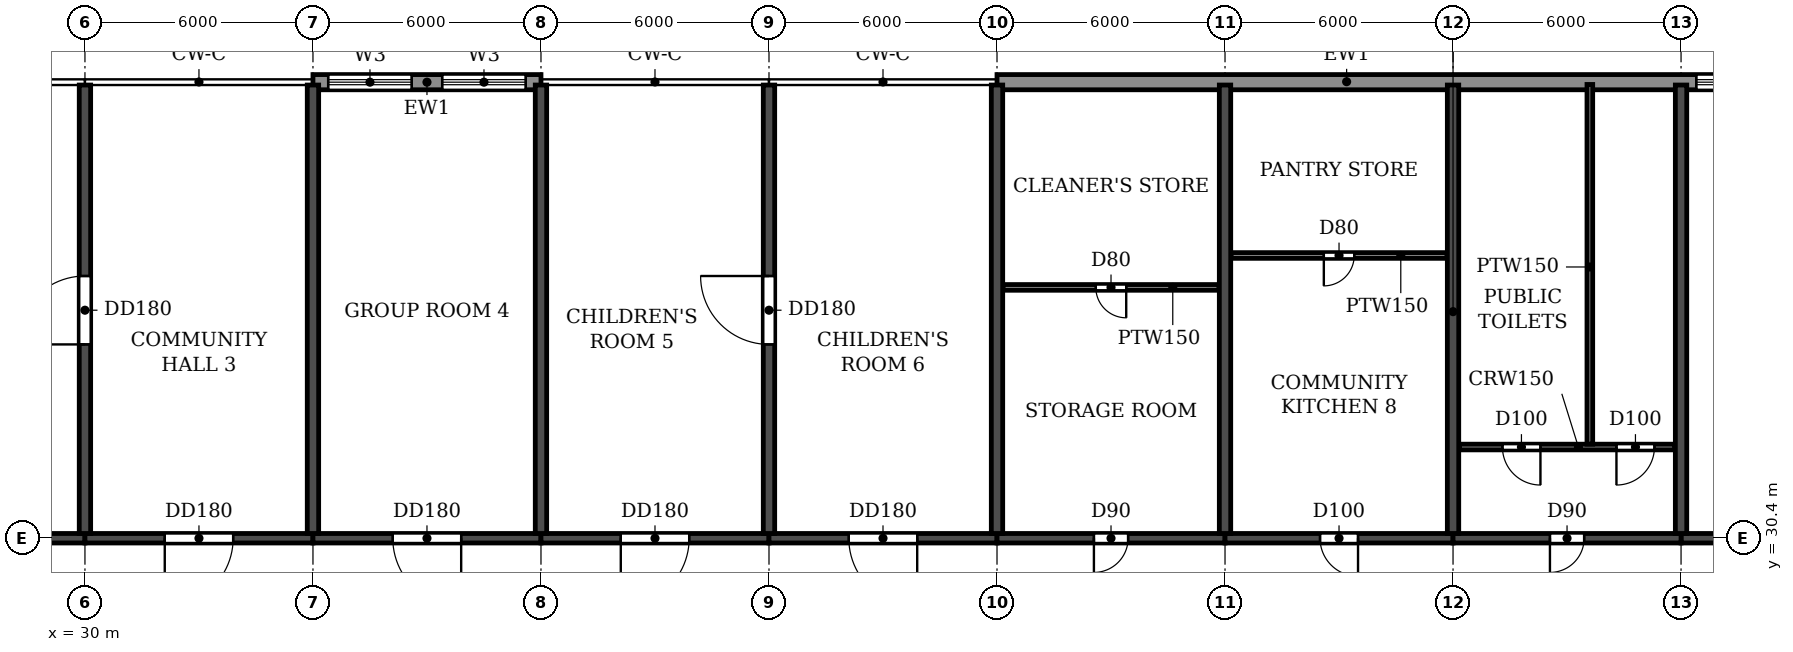
"""IFC4 building model, lengths in metres.
Left out: names, types, materials, properties, quantities, classifications, styles, units other than length and angle.
Written with IfcOpenShell. Run it as: python <this file> out.ifc"""

import sys

from ifc_helpers import new_model, si_unit, direction, frame, frame_2d, origin, place, context, subcontext, project, spatial, rectangle, extrude, element, fill, save


model = new_model("IFC4")
c1 = context("Model", 3, precision=1e-05, world=origin(), true_north=direction((0.0, 1.0)))
c2 = subcontext(c1, "Body", "Model", "MODEL_VIEW")
j1 = project(units=[si_unit("LENGTHUNIT", "METRE"), si_unit("PLANEANGLEUNIT", "RADIAN")], contexts=[c1])
p1 = place(None, origin())
s1 = spatial("IfcSite", under=j1, at=p1, CompositionType="ELEMENT")
p2 = place(p1, origin())
s2 = spatial("IfcBuilding", under=s1, at=p2, CompositionType="ELEMENT")
p3 = place(p2, frame((0.0, 0.0, 158.7)))
s3 = spatial("IfcBuildingStorey", under=s2, at=p3, CompositionType="ELEMENT", Elevation=158.7)
p4 = place(p3, frame((30.0, 30.525, 0.0), z_axis=(0.0, 0.0, 1.0), x_axis=(0.0, 1.0, 0.0)))
e1 = element("IfcWall", 1, at=p4, inside=s3, PredefinedType="SHEAR", context=c2, shape_type="SweptSolid", body=[
    extrude(rectangle(XDim=11.8, YDim=0.3, at=frame_2d((5.9, 0.0))), origin(), (0.0, 0.0, 1.0), 3.07),
])
p5 = place(p4, frame((4.975, 0.0, 0.0)))
e2 = element("IfcOpeningElement", 2, at=p5, cuts=e1, PredefinedType="OPENING", context=c2, shape_type="SweptSolid", body=[
    extrude(rectangle(XDim=1.8, YDim=2.1, at=frame_2d((0.9, 1.05))), frame((0.0, 0.16, 0.0), z_axis=(0.0, -1.0, 0.0), x_axis=(1.0, 0.0, 0.0)), (0.0, 0.0, 1.0), 0.32),
])
for number, where, z_axis, x_axis in (
    (3, (36.0, 30.525, 0.0), (0.0, 0.0, 1.0), (0.0, 1.0, 0.0)),
    (4, (42.0, 30.525, 0.0), (0.0, 0.0, 1.0), (0.0, 1.0, 0.0)),
):
    element("IfcWall", number, at=place(p3, frame(where, z_axis=z_axis, x_axis=x_axis)), inside=s3, PredefinedType="SHEAR", context=c2, shape_type="SweptSolid", body=[
        extrude(rectangle(XDim=11.8, YDim=0.3, at=frame_2d((5.9, 0.0))), origin(), (0.0, 0.0, 1.0), 3.07),
    ])
p6 = place(p3, frame((48.0, 30.525, 0.0), z_axis=(0.0, 0.0, 1.0), x_axis=(0.0, 1.0, 0.0)))
e5 = element("IfcWall", 5, at=p6, inside=s3, PredefinedType="SHEAR", context=c2, shape_type="SweptSolid", body=[
    extrude(rectangle(XDim=11.8, YDim=0.3, at=frame_2d((5.9, 0.0))), origin(), (0.0, 0.0, 1.0), 3.07),
])
p7 = place(p6, frame((4.975, 0.0, 0.0)))
e6 = element("IfcOpeningElement", 6, at=p7, cuts=e5, PredefinedType="OPENING", context=c2, shape_type="SweptSolid", body=[
    extrude(rectangle(XDim=1.8, YDim=2.1, at=frame_2d((0.9, 1.05))), frame((0.0, 0.16, 0.0), z_axis=(0.0, -1.0, 0.0), x_axis=(1.0, 0.0, 0.0)), (0.0, 0.0, 1.0), 0.32),
])
for number, where, z_axis, x_axis in (
    (7, (54.0, 30.525, 0.0), (0.0, 0.0, 1.0), (0.0, 1.0, 0.0)),
    (8, (60.0, 30.525, 0.0), (0.0, 0.0, 1.0), (0.0, 1.0, 0.0)),
    (9, (66.0, 30.525, 0.0), (0.0, 0.0, 1.0), (0.0, 1.0, 0.0)),
    (10, (72.0, 30.525, 0.0), (0.0, 0.0, 1.0), (0.0, 1.0, 0.0)),
):
    element("IfcWall", number, at=place(p3, frame(where, z_axis=z_axis, x_axis=x_axis)), inside=s3, PredefinedType="SHEAR", context=c2, shape_type="SweptSolid", body=[
        extrude(rectangle(XDim=11.8, YDim=0.3, at=frame_2d((5.9, 0.0))), origin(), (0.0, 0.0, 1.0), 3.07),
    ])
p8 = place(p3, frame((24.0, 30.4, 0.0), z_axis=(0.0, 0.0, 1.0), x_axis=(1.0, 0.0, 0.0)))
e11 = element("IfcWall", 11, at=p8, inside=s3, PredefinedType="SHEAR", context=c2, shape_type="SweptSolid", body=[
    extrude(rectangle(XDim=6.0, YDim=0.25, at=frame_2d((3.0, 0.0))), origin(), (0.0, 0.0, 1.0), 2.47),
])
p9 = place(p8, frame((2.1, 0.0, 0.0)))
e12 = element("IfcOpeningElement", 12, at=p9, cuts=e11, PredefinedType="OPENING", context=c2, shape_type="SweptSolid", body=[
    extrude(rectangle(XDim=1.8, YDim=2.1, at=frame_2d((0.9, 1.05))), frame((0.0, 0.135, 0.0), z_axis=(0.0, -1.0, 0.0), x_axis=(1.0, 0.0, 0.0)), (0.0, 0.0, 1.0), 0.27),
])
p10 = place(p3, frame((30.0, 30.4, 0.0), z_axis=(0.0, 0.0, 1.0), x_axis=(1.0, 0.0, 0.0)))
e13 = element("IfcWall", 13, at=p10, inside=s3, PredefinedType="SHEAR", context=c2, shape_type="SweptSolid", body=[
    extrude(rectangle(XDim=6.0, YDim=0.25, at=frame_2d((3.0, 0.0))), origin(), (0.0, 0.0, 1.0), 2.47),
])
p11 = place(p10, frame((2.1, 0.0, 0.0)))
e14 = element("IfcOpeningElement", 14, at=p11, cuts=e13, PredefinedType="OPENING", context=c2, shape_type="SweptSolid", body=[
    extrude(rectangle(XDim=1.8, YDim=2.1, at=frame_2d((0.9, 1.05))), frame((0.0, 0.135, 0.0), z_axis=(0.0, -1.0, 0.0), x_axis=(1.0, 0.0, 0.0)), (0.0, 0.0, 1.0), 0.27),
])
p12 = place(p3, frame((36.0, 30.4, 0.0), z_axis=(0.0, 0.0, 1.0), x_axis=(1.0, 0.0, 0.0)))
e15 = element("IfcWall", 15, at=p12, inside=s3, PredefinedType="SHEAR", context=c2, shape_type="SweptSolid", body=[
    extrude(rectangle(XDim=6.0, YDim=0.25, at=frame_2d((3.0, 0.0))), origin(), (0.0, 0.0, 1.0), 2.47),
])
p13 = place(p12, frame((2.1, 0.0, 0.0)))
e16 = element("IfcOpeningElement", 16, at=p13, cuts=e15, PredefinedType="OPENING", context=c2, shape_type="SweptSolid", body=[
    extrude(rectangle(XDim=1.8, YDim=2.1, at=frame_2d((0.9, 1.05))), frame((0.0, 0.135, 0.0), z_axis=(0.0, -1.0, 0.0), x_axis=(1.0, 0.0, 0.0)), (0.0, 0.0, 1.0), 0.27),
])
p14 = place(p3, frame((42.0, 30.4, 0.0), z_axis=(0.0, 0.0, 1.0), x_axis=(1.0, 0.0, 0.0)))
e17 = element("IfcWall", 17, at=p14, inside=s3, PredefinedType="SHEAR", context=c2, shape_type="SweptSolid", body=[
    extrude(rectangle(XDim=6.0, YDim=0.25, at=frame_2d((3.0, 0.0))), origin(), (0.0, 0.0, 1.0), 2.47),
])
p15 = place(p14, frame((2.1, 0.0, 0.0)))
e18 = element("IfcOpeningElement", 18, at=p15, cuts=e17, PredefinedType="OPENING", context=c2, shape_type="SweptSolid", body=[
    extrude(rectangle(XDim=1.8, YDim=2.1, at=frame_2d((0.9, 1.05))), frame((0.0, 0.135, 0.0), z_axis=(0.0, -1.0, 0.0), x_axis=(1.0, 0.0, 0.0)), (0.0, 0.0, 1.0), 0.27),
])
p16 = place(p3, frame((48.0, 30.4, 0.0), z_axis=(0.0, 0.0, 1.0), x_axis=(1.0, 0.0, 0.0)))
e19 = element("IfcWall", 19, at=p16, inside=s3, PredefinedType="SHEAR", context=c2, shape_type="SweptSolid", body=[
    extrude(rectangle(XDim=6.0, YDim=0.25, at=frame_2d((3.0, 0.0))), origin(), (0.0, 0.0, 1.0), 2.47),
])
p17 = place(p16, frame((2.1, 0.0, 0.0)))
e20 = element("IfcOpeningElement", 20, at=p17, cuts=e19, PredefinedType="OPENING", context=c2, shape_type="SweptSolid", body=[
    extrude(rectangle(XDim=1.8, YDim=2.1, at=frame_2d((0.9, 1.05))), frame((0.0, 0.135, 0.0), z_axis=(0.0, -1.0, 0.0), x_axis=(1.0, 0.0, 0.0)), (0.0, 0.0, 1.0), 0.27),
])
p18 = place(p3, frame((54.0, 30.4, 0.0), z_axis=(0.0, 0.0, 1.0), x_axis=(1.0, 0.0, 0.0)))
e21 = element("IfcWall", 21, at=p18, inside=s3, PredefinedType="SHEAR", context=c2, shape_type="SweptSolid", body=[
    extrude(rectangle(XDim=6.0, YDim=0.25, at=frame_2d((3.0, 0.0))), origin(), (0.0, 0.0, 1.0), 2.47),
])
p19 = place(p18, frame((2.55, 0.0, 0.0)))
e22 = element("IfcOpeningElement", 22, at=p19, cuts=e21, PredefinedType="OPENING", context=c2, shape_type="SweptSolid", body=[
    extrude(rectangle(XDim=0.9, YDim=2.1, at=frame_2d((0.45, 1.05))), frame((0.0, 0.135, 0.0), z_axis=(0.0, -1.0, 0.0), x_axis=(1.0, 0.0, 0.0)), (0.0, 0.0, 1.0), 0.27),
])
p20 = place(p3, frame((60.0, 30.4, 0.0), z_axis=(0.0, 0.0, 1.0), x_axis=(1.0, 0.0, 0.0)))
e23 = element("IfcWall", 23, at=p20, inside=s3, PredefinedType="SHEAR", context=c2, shape_type="SweptSolid", body=[
    extrude(rectangle(XDim=6.0, YDim=0.25, at=frame_2d((3.0, 0.0))), origin(), (0.0, 0.0, 1.0), 2.47),
])
p21 = place(p20, frame((2.5, 0.0, 0.0)))
e24 = element("IfcOpeningElement", 24, at=p21, cuts=e23, PredefinedType="OPENING", context=c2, shape_type="SweptSolid", body=[
    extrude(rectangle(XDim=1.0, YDim=2.1, at=frame_2d((0.5, 1.05))), frame((0.0, 0.135, 0.0), z_axis=(0.0, -1.0, 0.0), x_axis=(1.0, 0.0, 0.0)), (0.0, 0.0, 1.0), 0.27),
])
p22 = place(p3, frame((66.0, 30.4, 0.0), z_axis=(0.0, 0.0, 1.0), x_axis=(1.0, 0.0, 0.0)))
e25 = element("IfcWall", 25, at=p22, inside=s3, PredefinedType="SHEAR", context=c2, shape_type="SweptSolid", body=[
    extrude(rectangle(XDim=6.0, YDim=0.25, at=frame_2d((3.0, 0.0))), origin(), (0.0, 0.0, 1.0), 2.47),
])
p23 = place(p22, frame((2.55, 0.0, 0.0)))
e26 = element("IfcOpeningElement", 26, at=p23, cuts=e25, PredefinedType="OPENING", context=c2, shape_type="SweptSolid", body=[
    extrude(rectangle(XDim=0.9, YDim=2.1, at=frame_2d((0.45, 1.05))), frame((0.0, 0.135, 0.0), z_axis=(0.0, -1.0, 0.0), x_axis=(1.0, 0.0, 0.0)), (0.0, 0.0, 1.0), 0.27),
])
p24 = place(p3, frame((72.0, 30.4, 0.0), z_axis=(0.0, 0.0, 1.0), x_axis=(1.0, 0.0, 0.0)))
e27 = element("IfcWall", 27, at=p24, inside=s3, PredefinedType="SHEAR", context=c2, shape_type="SweptSolid", body=[
    extrude(rectangle(XDim=6.0, YDim=0.25, at=frame_2d((3.0, 0.0))), origin(), (0.0, 0.0, 1.0), 2.47),
])
p25 = place(p24, frame((2.1, 0.0, 0.0)))
e28 = element("IfcOpeningElement", 28, at=p25, cuts=e27, PredefinedType="OPENING", context=c2, shape_type="SweptSolid", body=[
    extrude(rectangle(XDim=1.8, YDim=2.1, at=frame_2d((0.9, 1.05))), frame((0.0, 0.135, 0.0), z_axis=(0.0, -1.0, 0.0), x_axis=(1.0, 0.0, 0.0)), (0.0, 0.0, 1.0), 0.27),
])
p26 = place(p3, frame((79.317, 42.4, 0.0), z_axis=(0.0, 0.0, 1.0), x_axis=(-1.0, 0.0, 0.0)))
e29 = element("IfcWall", 29, at=p26, inside=s3, PredefinedType="STANDARD", context=c2, shape_type="SweptSolid", body=[
    extrude(rectangle(XDim=25.317, YDim=0.4, at=frame_2d((12.659, 0.0))), origin(), (0.0, 0.0, 1.0), 3.07),
])
p27 = place(p26, frame((4.717, 0.0, 0.6)))
e30 = element("IfcOpeningElement", 30, at=p27, cuts=e29, PredefinedType="OPENING", context=c2, shape_type="SweptSolid", body=[
    extrude(rectangle(XDim=2.2, YDim=1.8, at=frame_2d((1.1, 0.9))), frame((0.0, 0.21, 0.0), z_axis=(0.0, -1.0, 0.0), x_axis=(1.0, 0.0, 0.0)), (0.0, 0.0, 1.0), 0.42),
])
p28 = place(p26, frame((1.717, 0.0, 0.6)))
e31 = element("IfcOpeningElement", 31, at=p28, cuts=e29, PredefinedType="OPENING", context=c2, shape_type="SweptSolid", body=[
    extrude(rectangle(XDim=2.2, YDim=1.8, at=frame_2d((1.1, 0.9))), frame((0.0, 0.21, 0.0), z_axis=(0.0, -1.0, 0.0), x_axis=(1.0, 0.0, 0.0)), (0.0, 0.0, 1.0), 0.42),
])
p29 = place(p3, frame((42.0, 42.4, 0.0), z_axis=(0.0, 0.0, 1.0), x_axis=(-1.0, 0.0, 0.0)))
e32 = element("IfcWall", 32, at=p29, inside=s3, PredefinedType="STANDARD", context=c2, shape_type="SweptSolid", body=[
    extrude(rectangle(XDim=6.0, YDim=0.4, at=frame_2d((3.0, 0.0))), origin(), (0.0, 0.0, 1.0), 3.07),
])
p30 = place(p29, frame((3.4, 0.0, 0.6)))
e33 = element("IfcOpeningElement", 33, at=p30, cuts=e32, PredefinedType="OPENING", context=c2, shape_type="SweptSolid", body=[
    extrude(rectangle(XDim=2.2, YDim=1.8, at=frame_2d((1.1, 0.9))), frame((0.0, 0.21, 0.0), z_axis=(0.0, -1.0, 0.0), x_axis=(1.0, 0.0, 0.0)), (0.0, 0.0, 1.0), 0.42),
])
p31 = place(p29, frame((0.4, 0.0, 0.6)))
e34 = element("IfcOpeningElement", 34, at=p31, cuts=e32, PredefinedType="OPENING", context=c2, shape_type="SweptSolid", body=[
    extrude(rectangle(XDim=2.2, YDim=1.8, at=frame_2d((1.1, 0.9))), frame((0.0, 0.21, 0.0), z_axis=(0.0, -1.0, 0.0), x_axis=(1.0, 0.0, 0.0)), (0.0, 0.0, 1.0), 0.42),
])
p32 = place(p3, frame((66.16, 32.8, 0.0), z_axis=(0.0, 0.0, 1.0), x_axis=(1.0, 0.0, 0.0)))
e35 = element("IfcWall", 35, at=p32, inside=s3, PredefinedType="PARTITIONING", context=c2, shape_type="SweptSolid", body=[
    extrude(rectangle(XDim=5.68, YDim=0.15, at=frame_2d((2.84, 0.0))), origin(), (0.0, 0.0, 1.0), 3.07),
])
p33 = place(p32, frame((1.14, 0.0, 0.0)))
e36 = element("IfcOpeningElement", 36, at=p33, cuts=e35, PredefinedType="OPENING", context=c2, shape_type="SweptSolid", body=[
    extrude(rectangle(XDim=1.0, YDim=2.1, at=frame_2d((0.5, 1.05))), frame((0.0, 0.085, 0.0), z_axis=(0.0, -1.0, 0.0), x_axis=(1.0, 0.0, 0.0)), (0.0, 0.0, 1.0), 0.17),
])
p34 = place(p32, frame((4.14, 0.0, 0.0)))
e37 = element("IfcOpeningElement", 37, at=p34, cuts=e35, PredefinedType="OPENING", context=c2, shape_type="SweptSolid", body=[
    extrude(rectangle(XDim=1.0, YDim=2.1, at=frame_2d((0.5, 1.05))), frame((0.0, 0.085, 0.0), z_axis=(0.0, -1.0, 0.0), x_axis=(1.0, 0.0, 0.0)), (0.0, 0.0, 1.0), 0.17),
])
p35 = place(p3, frame((54.16, 37.0, 0.0), z_axis=(0.0, 0.0, 1.0), x_axis=(1.0, 0.0, 0.0)))
e38 = element("IfcWall", 38, at=p35, inside=s3, PredefinedType="PARTITIONING", context=c2, shape_type="SweptSolid", body=[
    extrude(rectangle(XDim=5.68, YDim=0.15, at=frame_2d((2.84, 0.0))), origin(), (0.0, 0.0, 1.0), 3.07),
])
p36 = place(p35, frame((2.44, 0.0, 0.0)))
e39 = element("IfcOpeningElement", 39, at=p36, cuts=e38, PredefinedType="OPENING", context=c2, shape_type="SweptSolid", body=[
    extrude(rectangle(XDim=0.8, YDim=2.1, at=frame_2d((0.4, 1.05))), frame((0.0, 0.085, 0.0), z_axis=(0.0, -1.0, 0.0), x_axis=(1.0, 0.0, 0.0)), (0.0, 0.0, 1.0), 0.17),
])
p37 = place(p3, frame((60.16, 37.84, 0.0), z_axis=(0.0, 0.0, 1.0), x_axis=(1.0, 0.0, 0.0)))
e40 = element("IfcWall", 40, at=p37, inside=s3, PredefinedType="PARTITIONING", context=c2, shape_type="SweptSolid", body=[
    extrude(rectangle(XDim=5.68, YDim=0.15, at=frame_2d((2.84, 0.0))), origin(), (0.0, 0.0, 1.0), 3.07),
])
p38 = place(p37, frame((2.44, 0.0, 0.0)))
e41 = element("IfcOpeningElement", 41, at=p38, cuts=e40, PredefinedType="OPENING", context=c2, shape_type="SweptSolid", body=[
    extrude(rectangle(XDim=0.8, YDim=2.1, at=frame_2d((0.4, 1.05))), frame((0.0, 0.085, 0.0), z_axis=(0.0, -1.0, 0.0), x_axis=(1.0, 0.0, 0.0)), (0.0, 0.0, 1.0), 0.17),
])
p39 = place(p3, frame((69.6, 32.875, 0.0), z_axis=(0.0, 0.0, 1.0), x_axis=(0.0, 1.0, 0.0)))
e42 = element("IfcWall", 42, at=p39, inside=s3, PredefinedType="PARTITIONING", context=c2, shape_type="SweptSolid", body=[
    extrude(rectangle(XDim=9.465, YDim=0.15, at=frame_2d((4.732, 0.0))), origin(), (0.0, 0.0, 1.0), 3.07),
])
p40 = place(p27, origin())
e43 = element("IfcWindow", 43, at=p40, inside=s3, PartitioningType="DOUBLE_PANEL_HORIZONTAL", PredefinedType="WINDOW", context=c2, shape_type="SweptSolid", body=[
    extrude(rectangle(XDim=2.2, YDim=1.8, at=frame_2d((1.1, 0.9))), frame((0.0, 0.03, 0.0), z_axis=(0.0, -1.0, 0.0), x_axis=(1.0, 0.0, 0.0)), (0.0, 0.0, 1.0), 0.06),
])
fill(e30, e43)
p41 = place(p30, origin())
e44 = element("IfcWindow", 44, at=p41, inside=s3, PartitioningType="DOUBLE_PANEL_HORIZONTAL", PredefinedType="WINDOW", context=c2, shape_type="SweptSolid", body=[
    extrude(rectangle(XDim=2.2, YDim=1.8, at=frame_2d((1.1, 0.9))), frame((0.0, 0.03, 0.0), z_axis=(0.0, -1.0, 0.0), x_axis=(1.0, 0.0, 0.0)), (0.0, 0.0, 1.0), 0.06),
])
fill(e33, e44)
p42 = place(p31, origin())
e45 = element("IfcWindow", 45, at=p42, inside=s3, PartitioningType="DOUBLE_PANEL_HORIZONTAL", PredefinedType="WINDOW", context=c2, shape_type="SweptSolid", body=[
    extrude(rectangle(XDim=2.2, YDim=1.8, at=frame_2d((1.1, 0.9))), frame((0.0, 0.03, 0.0), z_axis=(0.0, -1.0, 0.0), x_axis=(1.0, 0.0, 0.0)), (0.0, 0.0, 1.0), 0.06),
])
fill(e34, e45)
p43 = place(p11, frame((1.8, 0.0, 0.0), z_axis=(0.0, 0.0, 1.0), x_axis=(-1.0, 0.0, 0.0)))
e46 = element("IfcDoor", 46, at=p43, inside=s3, OperationType="DOUBLE_DOOR_SINGLE_SWING", PredefinedType="DOOR", context=c2, shape_type="SweptSolid", body=[
    extrude(rectangle(XDim=1.8, YDim=2.1, at=frame_2d((0.9, 1.05))), frame((0.0, 0.025, 0.0), z_axis=(0.0, -1.0, 0.0), x_axis=(1.0, 0.0, 0.0)), (0.0, 0.0, 1.0), 0.05),
])
fill(e14, e46)
p44 = place(p13, frame((1.8, 0.0, 0.0), z_axis=(0.0, 0.0, 1.0), x_axis=(-1.0, 0.0, 0.0)))
e47 = element("IfcDoor", 47, at=p44, inside=s3, OperationType="DOUBLE_DOOR_SINGLE_SWING", PredefinedType="DOOR", context=c2, shape_type="SweptSolid", body=[
    extrude(rectangle(XDim=1.8, YDim=2.1, at=frame_2d((0.9, 1.05))), frame((0.0, 0.025, 0.0), z_axis=(0.0, -1.0, 0.0), x_axis=(1.0, 0.0, 0.0)), (0.0, 0.0, 1.0), 0.05),
])
fill(e16, e47)
p45 = place(p15, frame((1.8, 0.0, 0.0), z_axis=(0.0, 0.0, 1.0), x_axis=(-1.0, 0.0, 0.0)))
e48 = element("IfcDoor", 48, at=p45, inside=s3, OperationType="DOUBLE_DOOR_SINGLE_SWING", PredefinedType="DOOR", context=c2, shape_type="SweptSolid", body=[
    extrude(rectangle(XDim=1.8, YDim=2.1, at=frame_2d((0.9, 1.05))), frame((0.0, 0.025, 0.0), z_axis=(0.0, -1.0, 0.0), x_axis=(1.0, 0.0, 0.0)), (0.0, 0.0, 1.0), 0.05),
])
fill(e18, e48)
p46 = place(p17, frame((1.8, 0.0, 0.0), z_axis=(0.0, 0.0, 1.0), x_axis=(-1.0, 0.0, 0.0)))
e49 = element("IfcDoor", 49, at=p46, inside=s3, OperationType="DOUBLE_DOOR_SINGLE_SWING", PredefinedType="DOOR", context=c2, shape_type="SweptSolid", body=[
    extrude(rectangle(XDim=1.8, YDim=2.1, at=frame_2d((0.9, 1.05))), frame((0.0, 0.025, 0.0), z_axis=(0.0, -1.0, 0.0), x_axis=(1.0, 0.0, 0.0)), (0.0, 0.0, 1.0), 0.05),
])
fill(e20, e49)
p47 = place(p19, frame((0.9, 0.0, 0.0), z_axis=(0.0, 0.0, 1.0), x_axis=(-1.0, 0.0, 0.0)))
e50 = element("IfcDoor", 50, at=p47, inside=s3, OperationType="SINGLE_SWING_RIGHT", PredefinedType="DOOR", context=c2, shape_type="SweptSolid", body=[
    extrude(rectangle(XDim=0.9, YDim=2.1, at=frame_2d((0.45, 1.05))), frame((0.0, 0.025, 0.0), z_axis=(0.0, -1.0, 0.0), x_axis=(1.0, 0.0, 0.0)), (0.0, 0.0, 1.0), 0.05),
])
fill(e22, e50)
p48 = place(p21, frame((1.0, 0.0, 0.0), z_axis=(0.0, 0.0, 1.0), x_axis=(-1.0, 0.0, 0.0)))
e51 = element("IfcDoor", 51, at=p48, inside=s3, OperationType="SINGLE_SWING_LEFT", PredefinedType="DOOR", context=c2, shape_type="SweptSolid", body=[
    extrude(rectangle(XDim=1.0, YDim=2.1, at=frame_2d((0.5, 1.05))), frame((0.0, 0.025, 0.0), z_axis=(0.0, -1.0, 0.0), x_axis=(1.0, 0.0, 0.0)), (0.0, 0.0, 1.0), 0.05),
])
fill(e24, e51)
p49 = place(p23, frame((0.9, 0.0, 0.0), z_axis=(0.0, 0.0, 1.0), x_axis=(-1.0, 0.0, 0.0)))
e52 = element("IfcDoor", 52, at=p49, inside=s3, OperationType="SINGLE_SWING_RIGHT", PredefinedType="DOOR", context=c2, shape_type="SweptSolid", body=[
    extrude(rectangle(XDim=0.9, YDim=2.1, at=frame_2d((0.45, 1.05))), frame((0.0, 0.025, 0.0), z_axis=(0.0, -1.0, 0.0), x_axis=(1.0, 0.0, 0.0)), (0.0, 0.0, 1.0), 0.05),
])
fill(e26, e52)
p50 = place(p5, origin())
e53 = element("IfcDoor", 53, at=p50, inside=s3, OperationType="DOUBLE_DOOR_SINGLE_SWING", PredefinedType="DOOR", context=c2, shape_type="SweptSolid", body=[
    extrude(rectangle(XDim=1.8, YDim=2.1, at=frame_2d((0.9, 1.05))), frame((0.0, 0.025, 0.0), z_axis=(0.0, -1.0, 0.0), x_axis=(1.0, 0.0, 0.0)), (0.0, 0.0, 1.0), 0.05),
])
fill(e2, e53)
p51 = place(p7, origin())
e54 = element("IfcDoor", 54, at=p51, inside=s3, OperationType="DOUBLE_DOOR_SINGLE_SWING", PredefinedType="DOOR", context=c2, shape_type="SweptSolid", body=[
    extrude(rectangle(XDim=1.8, YDim=2.1, at=frame_2d((0.9, 1.05))), frame((0.0, 0.025, 0.0), z_axis=(0.0, -1.0, 0.0), x_axis=(1.0, 0.0, 0.0)), (0.0, 0.0, 1.0), 0.05),
])
fill(e6, e54)
p52 = place(p36, frame((0.8, 0.0, 0.0), z_axis=(0.0, 0.0, 1.0), x_axis=(-1.0, 0.0, 0.0)))
e55 = element("IfcDoor", 55, at=p52, inside=s3, OperationType="SINGLE_SWING_LEFT", PredefinedType="DOOR", context=c2, shape_type="SweptSolid", body=[
    extrude(rectangle(XDim=0.8, YDim=2.1, at=frame_2d((0.4, 1.05))), frame((0.0, 0.025, 0.0), z_axis=(0.0, -1.0, 0.0), x_axis=(1.0, 0.0, 0.0)), (0.0, 0.0, 1.0), 0.05),
])
fill(e39, e55)
p53 = place(p38, frame((0.8, 0.0, 0.0), z_axis=(0.0, 0.0, 1.0), x_axis=(-1.0, 0.0, 0.0)))
e56 = element("IfcDoor", 56, at=p53, inside=s3, OperationType="SINGLE_SWING_RIGHT", PredefinedType="DOOR", context=c2, shape_type="SweptSolid", body=[
    extrude(rectangle(XDim=0.8, YDim=2.1, at=frame_2d((0.4, 1.05))), frame((0.0, 0.025, 0.0), z_axis=(0.0, -1.0, 0.0), x_axis=(1.0, 0.0, 0.0)), (0.0, 0.0, 1.0), 0.05),
])
fill(e41, e56)
p54 = place(p33, frame((1.0, 0.0, 0.0), z_axis=(0.0, 0.0, 1.0), x_axis=(-1.0, 0.0, 0.0)))
e57 = element("IfcDoor", 57, at=p54, inside=s3, OperationType="SINGLE_SWING_LEFT", PredefinedType="DOOR", context=c2, shape_type="SweptSolid", body=[
    extrude(rectangle(XDim=1.0, YDim=2.1, at=frame_2d((0.5, 1.05))), frame((0.0, 0.025, 0.0), z_axis=(0.0, -1.0, 0.0), x_axis=(1.0, 0.0, 0.0)), (0.0, 0.0, 1.0), 0.05),
])
fill(e36, e57)
p55 = place(p34, frame((1.0, 0.0, 0.0), z_axis=(0.0, 0.0, 1.0), x_axis=(-1.0, 0.0, 0.0)))
e58 = element("IfcDoor", 58, at=p55, inside=s3, OperationType="SINGLE_SWING_RIGHT", PredefinedType="DOOR", context=c2, shape_type="SweptSolid", body=[
    extrude(rectangle(XDim=1.0, YDim=2.1, at=frame_2d((0.5, 1.05))), frame((0.0, 0.025, 0.0), z_axis=(0.0, -1.0, 0.0), x_axis=(1.0, 0.0, 0.0)), (0.0, 0.0, 1.0), 0.05),
])
fill(e37, e58)
save(model, sys.argv[1])
